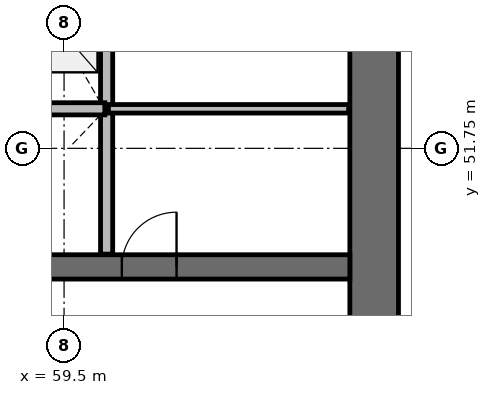
"""IFC4 building model, lengths in metres.
Left out: names, types, materials, properties, quantities, classifications, styles, units other than length and angle.
Written with IfcOpenShell. Run it as: python <this file> out.ifc"""

import sys

from ifc_helpers import new_model, si_unit, direction, frame, frame_2d, origin, place, context, subcontext, project, spatial, rectangle, extrude, source, transform, mapped, element, fill, save


model = new_model("IFC4")
c1 = context("Model", 3, precision=1e-05, world=origin(), true_north=direction((0.0, 1.0)))
c2 = subcontext(c1, "Body", "Model", "MODEL_VIEW")
j1 = project(units=[si_unit("LENGTHUNIT", "METRE"), si_unit("PLANEANGLEUNIT", "RADIAN")], contexts=[c1])
p1 = place(None, origin())
s1 = spatial("IfcSite", under=j1, at=p1, CompositionType="ELEMENT")
p2 = place(p1, origin())
s2 = spatial("IfcBuilding", under=s1, at=p2, CompositionType="ELEMENT")
p3 = place(p2, frame((0.0, 0.0, 79.8)))
s3 = spatial("IfcBuildingStorey", under=s2, at=p3, CompositionType="ELEMENT", Elevation=79.8)
p4 = place(p3, frame((64.6, 38.0, 0.0), z_axis=(0.0, 0.0, 1.0), x_axis=(0.0, 1.0, 0.0)))
e1 = element("IfcWall", 1, at=p4, inside=s3, PredefinedType="SHEAR", context=c2, shape_type="SweptSolid", body=[
    extrude(rectangle(XDim=20.0, YDim=0.8, at=frame_2d((10.0, 0.0))), origin(), (0.0, 0.0, 1.0), 4.1),
])
p5 = place(p4, frame((9.1, 0.0, 0.0)))
e2 = element("IfcOpeningElement", 2, at=p5, cuts=e1, PredefinedType="OPENING", context=c2, shape_type="SweptSolid", body=[
    extrude(rectangle(XDim=1.8, YDim=2.1, at=frame_2d((0.9, 1.05))), frame((0.0, 0.41, 0.0), z_axis=(0.0, -1.0, 0.0), x_axis=(1.0, 0.0, 0.0)), (0.0, 0.0, 1.0), 0.82),
])
p6 = place(p3, frame((39.8, 49.8, 0.0), z_axis=(0.0, 0.0, 1.0), x_axis=(1.0, 0.0, 0.0)))
e3 = element("IfcWall", 3, at=p6, inside=s3, PredefinedType="SHEAR", context=c2, shape_type="SweptSolid", body=[
    extrude(rectangle(XDim=24.4, YDim=0.4, at=frame_2d((12.2, 0.0))), origin(), (0.0, 0.0, 1.0), 4.1),
])
p7 = place(p6, frame((4.7, 0.0, 0.0)))
e4 = element("IfcOpeningElement", 4, at=p7, cuts=e3, PredefinedType="OPENING", context=c2, shape_type="SweptSolid", body=[
    extrude(rectangle(XDim=1.1, YDim=2.1, at=frame_2d((0.55, 1.05))), frame((0.0, 0.21, 0.0), z_axis=(0.0, -1.0, 0.0), x_axis=(1.0, 0.0, 0.0)), (0.0, 0.0, 1.0), 0.42),
])
p8 = place(p6, frame((7.2, 0.0, 0.0)))
e5 = element("IfcOpeningElement", 5, at=p8, cuts=e3, PredefinedType="OPENING", context=c2, shape_type="SweptSolid", body=[
    extrude(rectangle(XDim=1.1, YDim=2.1, at=frame_2d((0.55, 1.05))), frame((0.0, 0.21, 0.0), z_axis=(0.0, -1.0, 0.0), x_axis=(1.0, 0.0, 0.0)), (0.0, 0.0, 1.0), 0.42),
])
p9 = place(p6, frame((9.7, 0.0, 0.0)))
e6 = element("IfcOpeningElement", 6, at=p9, cuts=e3, PredefinedType="OPENING", context=c2, shape_type="SweptSolid", body=[
    extrude(rectangle(XDim=1.1, YDim=2.1, at=frame_2d((0.55, 1.05))), frame((0.0, 0.21, 0.0), z_axis=(0.0, -1.0, 0.0), x_axis=(1.0, 0.0, 0.0)), (0.0, 0.0, 1.0), 0.42),
])
p10 = place(p6, frame((1.1, 0.0, 0.0)))
e7 = element("IfcOpeningElement", 7, at=p10, cuts=e3, PredefinedType="OPENING", context=c2, shape_type="SweptSolid", body=[
    extrude(rectangle(XDim=1.8, YDim=2.4, at=frame_2d((0.9, 1.2))), frame((0.0, 0.21, 0.0), z_axis=(0.0, -1.0, 0.0), x_axis=(1.0, 0.0, 0.0)), (0.0, 0.0, 1.0), 0.42),
])
p11 = place(p6, frame((20.65, 0.0, 0.0)))
e8 = element("IfcOpeningElement", 8, at=p11, cuts=e3, PredefinedType="OPENING", context=c2, shape_type="SweptSolid", body=[
    extrude(rectangle(XDim=0.9, YDim=2.1, at=frame_2d((0.45, 1.05))), frame((0.0, 0.21, 0.0), z_axis=(0.0, -1.0, 0.0), x_axis=(1.0, 0.0, 0.0)), (0.0, 0.0, 1.0), 0.42),
])
p12 = place(p6, frame((11.85, 0.0, 0.0)))
e9 = element("IfcOpeningElement", 9, at=p12, cuts=e3, PredefinedType="OPENING", context=c2, shape_type="SweptSolid", body=[
    extrude(rectangle(XDim=0.9, YDim=2.1, at=frame_2d((0.45, 1.05))), frame((0.0, 0.21, 0.0), z_axis=(0.0, -1.0, 0.0), x_axis=(1.0, 0.0, 0.0)), (0.0, 0.0, 1.0), 0.42),
])
p13 = place(p3, frame((60.2, 52.4, 0.0), z_axis=(0.0, 0.0, 1.0), x_axis=(0.0, 1.0, 0.0)))
e10 = element("IfcWall", 10, at=p13, inside=s3, PredefinedType="SOLIDWALL", context=c2, shape_type="SweptSolid", body=[
    extrude(rectangle(XDim=2.8, YDim=0.2, at=frame_2d((1.4, 0.0))), origin(), (0.0, 0.0, 1.0), 3.7),
])
p14 = place(p3, frame((60.2, 50.01, 0.0), z_axis=(0.0, 0.0, 1.0), x_axis=(0.0, 1.0, 0.0)))
e11 = element("IfcWall", 11, at=p14, inside=s3, PredefinedType="SOLIDWALL", context=c2, shape_type="SweptSolid", body=[
    extrude(rectangle(XDim=2.36, YDim=0.2, at=frame_2d((1.18, 0.0))), origin(), (0.0, 0.0, 1.0), 3.7),
])
p15 = place(p3, frame((60.17, 52.4, 0.0), z_axis=(0.0, 0.0, 1.0), x_axis=(-1.0, 0.0, 0.0)))
e12 = element("IfcWall", 12, at=p15, inside=s3, PredefinedType="SOLIDWALL", context=c2, shape_type="SweptSolid", body=[
    extrude(rectangle(XDim=1.64, YDim=0.2, at=frame_2d((0.82, 0.0))), origin(), (0.0, 0.0, 1.0), 3.7),
])
p16 = place(p3, frame((64.18, 52.4, 0.0), z_axis=(0.0, 0.0, 1.0), x_axis=(-1.0, 0.0, 0.0)))
e13 = element("IfcWall", 13, at=p16, inside=s3, PredefinedType="PARTITIONING", context=c2, shape_type="SweptSolid", body=[
    extrude(rectangle(XDim=3.95, YDim=0.14, at=frame_2d((1.975, 0.0))), origin(), (0.0, 0.0, 1.0), 2.9),
])
m1 = source(origin(), c2, "Body", "SweptSolid", [
    extrude(rectangle(XDim=0.9, YDim=2.1, at=frame_2d((0.45, 1.05))), frame((0.0, 0.025, 0.0), z_axis=(0.0, -1.0, 0.0), x_axis=(1.0, 0.0, 0.0)), (0.0, 0.0, 1.0), 0.05),
])
p17 = place(p11, origin())
e14 = element("IfcDoor", 14, at=p17, inside=s3, OperationType="SINGLE_SWING_RIGHT", PredefinedType="DOOR", context=c2, shape_type="MappedRepresentation", body=[
    mapped(m1, transform((0.0, 0.0, 0.0), scale=1.0)),
])
fill(e8, e14)
save(model, sys.argv[1])
